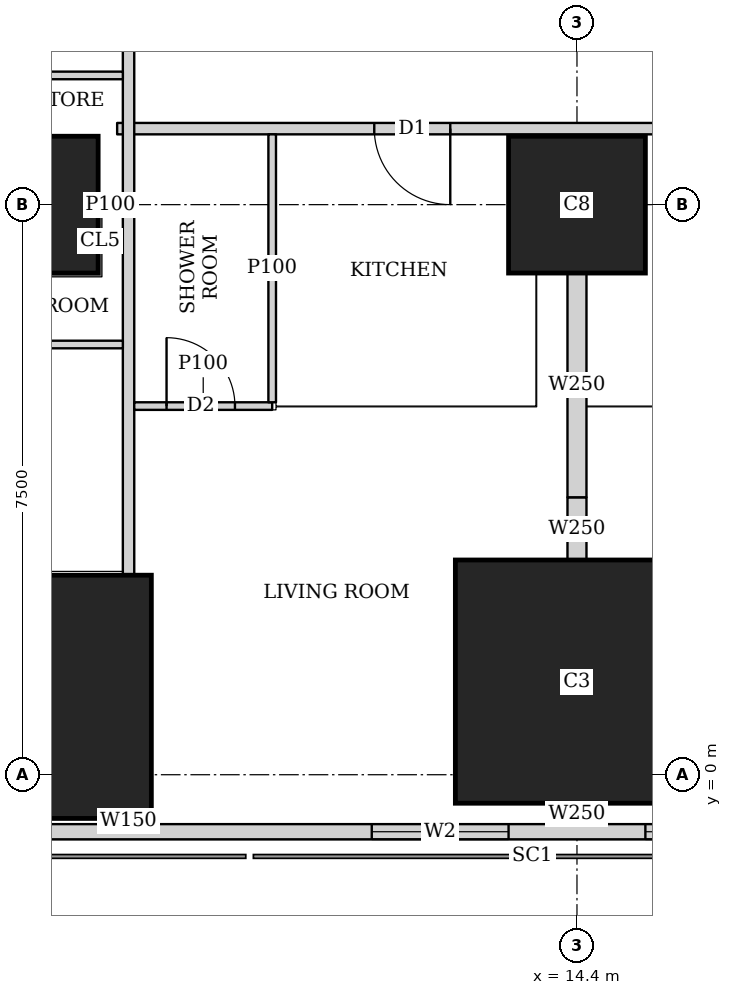
"""IFC4 building model, lengths in metres.
Left out: names, types, materials, properties, quantities, classifications, styles, units other than length and angle.
Written with IfcOpenShell. Run it as: python <this file> out.ifc"""

import sys

from ifc_helpers import new_model, si_unit, direction, frame, frame_2d, origin, origin_2d, place, context, subcontext, project, spatial, rectangle, extrude, element, fill, save


model = new_model("IFC4")
c1 = context("Model", 3, precision=1e-05, world=origin(), true_north=direction((0.0, 1.0)))
c2 = subcontext(c1, "Body", "Model", "MODEL_VIEW")
j1 = project(units=[si_unit("LENGTHUNIT", "METRE"), si_unit("PLANEANGLEUNIT", "RADIAN")], contexts=[c1])
p1 = place(None, origin())
s1 = spatial("IfcSite", under=j1, at=p1, CompositionType="ELEMENT")
p2 = place(p1, origin())
s2 = spatial("IfcBuilding", under=s1, at=p2, CompositionType="ELEMENT")
p3 = place(p2, frame((0.0, 0.0, 23.75)))
s3 = spatial("IfcBuildingStorey", under=s2, at=p3, CompositionType="ELEMENT", Elevation=23.75)
for number, where, z_axis, x_axis in (
    (1, (7.2, 1.025, 0.0), (0.0, 0.0, 1.0), (1.0, 0.0, 0.0)),
    (2, (14.4, 1.225, 0.0), (0.0, 0.0, 1.0), (1.0, 0.0, 0.0)),
):
    element("IfcColumn", number, at=place(p3, frame(where, z_axis=z_axis, x_axis=x_axis)), inside=s3, PredefinedType="COLUMN", context=c2, shape_type="SweptSolid", body=[
        extrude(rectangle(XDim=3.2, YDim=3.2, at=origin_2d()), origin(), (0.0, 0.0, 1.0), 3.75),
    ])
for number, where, z_axis, x_axis in (
    (3, (7.2, 7.5, 0.0), (0.0, 0.0, 1.0), (1.0, 0.0, 0.0)),
    (4, (14.4, 7.5, 0.0), (0.0, 0.0, 1.0), (1.0, 0.0, 0.0)),
):
    element("IfcColumn", number, at=place(p3, frame(where, z_axis=z_axis, x_axis=x_axis)), inside=s3, PredefinedType="COLUMN", context=c2, shape_type="SweptSolid", body=[
        extrude(rectangle(XDim=1.8, YDim=1.8, at=origin_2d()), origin(), (0.0, 0.0, 1.0), 3.75),
    ])
p4 = place(p3, frame((2.163, -0.75, 0.0), z_axis=(0.0, 0.0, 1.0), x_axis=(1.0, 0.0, 0.0)))
e5 = element("IfcWall", 5, at=p4, inside=s3, PredefinedType="SOLIDWALL", context=c2, shape_type="SweptSolid", body=[
    extrude(rectangle(XDim=45.628, YDim=0.2, at=frame_2d((22.814, 0.0))), origin(), (0.0, 0.0, 1.0), 3.5),
])
p5 = place(p4, frame((9.537, 0.0, 0.9)))
e6 = element("IfcOpeningElement", 6, at=p5, cuts=e5, PredefinedType="OPENING", context=c2, shape_type="SweptSolid", body=[
    extrude(rectangle(XDim=1.8, YDim=1.5, at=frame_2d((0.9, 0.75))), frame((0.0, 0.11, 0.0), z_axis=(0.0, -1.0, 0.0), x_axis=(1.0, 0.0, 0.0)), (0.0, 0.0, 1.0), 0.22),
])
p6 = place(p4, frame((13.137, 0.0, 0.9)))
e7 = element("IfcOpeningElement", 7, at=p6, cuts=e5, PredefinedType="OPENING", context=c2, shape_type="SweptSolid", body=[
    extrude(rectangle(XDim=1.8, YDim=1.5, at=frame_2d((0.9, 0.75))), frame((0.0, 0.11, 0.0), z_axis=(0.0, -1.0, 0.0), x_axis=(1.0, 0.0, 0.0)), (0.0, 0.0, 1.0), 0.22),
])
p7 = place(p4, frame((16.737, 0.0, 0.9)))
e8 = element("IfcOpeningElement", 8, at=p7, cuts=e5, PredefinedType="OPENING", context=c2, shape_type="SweptSolid", body=[
    extrude(rectangle(XDim=1.8, YDim=1.5, at=frame_2d((0.9, 0.75))), frame((0.0, 0.11, 0.0), z_axis=(0.0, -1.0, 0.0), x_axis=(1.0, 0.0, 0.0)), (0.0, 0.0, 1.0), 0.22),
])
p8 = place(p4, frame((20.337, 0.0, 0.9)))
e9 = element("IfcOpeningElement", 9, at=p8, cuts=e5, PredefinedType="OPENING", context=c2, shape_type="SweptSolid", body=[
    extrude(rectangle(XDim=1.8, YDim=1.5, at=frame_2d((0.9, 0.75))), frame((0.0, 0.11, 0.0), z_axis=(0.0, -1.0, 0.0), x_axis=(1.0, 0.0, 0.0)), (0.0, 0.0, 1.0), 0.22),
])
p9 = place(p4, frame((23.937, 0.0, 0.9)))
e10 = element("IfcOpeningElement", 10, at=p9, cuts=e5, PredefinedType="OPENING", context=c2, shape_type="SweptSolid", body=[
    extrude(rectangle(XDim=1.8, YDim=1.5, at=frame_2d((0.9, 0.75))), frame((0.0, 0.11, 0.0), z_axis=(0.0, -1.0, 0.0), x_axis=(1.0, 0.0, 0.0)), (0.0, 0.0, 1.0), 0.22),
])
p10 = place(p4, frame((27.537, 0.0, 0.9)))
e11 = element("IfcOpeningElement", 11, at=p10, cuts=e5, PredefinedType="OPENING", context=c2, shape_type="SweptSolid", body=[
    extrude(rectangle(XDim=1.8, YDim=1.5, at=frame_2d((0.9, 0.75))), frame((0.0, 0.11, 0.0), z_axis=(0.0, -1.0, 0.0), x_axis=(1.0, 0.0, 0.0)), (0.0, 0.0, 1.0), 0.22),
])
p11 = place(p4, frame((31.137, 0.0, 0.9)))
e12 = element("IfcOpeningElement", 12, at=p11, cuts=e5, PredefinedType="OPENING", context=c2, shape_type="SweptSolid", body=[
    extrude(rectangle(XDim=1.8, YDim=1.5, at=frame_2d((0.9, 0.75))), frame((0.0, 0.11, 0.0), z_axis=(0.0, -1.0, 0.0), x_axis=(1.0, 0.0, 0.0)), (0.0, 0.0, 1.0), 0.22),
])
p12 = place(p4, frame((34.737, 0.0, 0.9)))
e13 = element("IfcOpeningElement", 13, at=p12, cuts=e5, PredefinedType="OPENING", context=c2, shape_type="SweptSolid", body=[
    extrude(rectangle(XDim=1.8, YDim=1.5, at=frame_2d((0.9, 0.75))), frame((0.0, 0.11, 0.0), z_axis=(0.0, -1.0, 0.0), x_axis=(1.0, 0.0, 0.0)), (0.0, 0.0, 1.0), 0.22),
])
p13 = place(p3, frame((8.5, -0.65, 0.0), z_axis=(0.0, 0.0, 1.0), x_axis=(0.0, 1.0, 0.0)))
e14 = element("IfcWall", 14, at=p13, inside=s3, PredefinedType="SOLIDWALL", context=c2, shape_type="SweptSolid", body=[
    extrude(rectangle(XDim=0.074, YDim=0.15, at=frame_2d((0.037, 0.0))), origin(), (0.0, 0.0, 1.0), 3.5),
])
p14 = place(p3, frame((8.5, 2.626, 0.0), z_axis=(0.0, 0.0, 1.0), x_axis=(0.0, 1.0, 0.0)))
e15 = element("IfcWall", 15, at=p14, inside=s3, PredefinedType="SOLIDWALL", context=c2, shape_type="SweptSolid", body=[
    extrude(rectangle(XDim=39.773, YDim=0.15, at=frame_2d((19.886, 0.0))), origin(), (0.0, 0.0, 1.0), 2.05),
])
p15 = place(p14, frame((9.786, 0.0, 0.0)))
e16 = element("IfcOpeningElement", 16, at=p15, cuts=e15, PredefinedType="OPENING", context=c2, shape_type="SweptSolid", body=[
    extrude(rectangle(XDim=1.0, YDim=2.0, at=frame_2d((0.5, 1.0))), frame((0.0, 0.085, 0.0), z_axis=(0.0, -1.0, 0.0), x_axis=(1.0, 0.0, 0.0)), (0.0, 0.0, 1.0), 0.17),
])
p16 = place(p14, frame((13.961, 0.0, 0.0)))
e17 = element("IfcOpeningElement", 17, at=p16, cuts=e15, PredefinedType="OPENING", context=c2, shape_type="SweptSolid", body=[
    extrude(rectangle(XDim=1.0, YDim=2.0, at=frame_2d((0.5, 1.0))), frame((0.0, 0.085, 0.0), z_axis=(0.0, -1.0, 0.0), x_axis=(1.0, 0.0, 0.0)), (0.0, 0.0, 1.0), 0.17),
])
p17 = place(p14, frame((24.787, 0.0, 0.0)))
e18 = element("IfcOpeningElement", 18, at=p17, cuts=e15, PredefinedType="OPENING", context=c2, shape_type="SweptSolid", body=[
    extrude(rectangle(XDim=1.0, YDim=2.0, at=frame_2d((0.5, 1.0))), frame((0.0, 0.085, 0.0), z_axis=(0.0, -1.0, 0.0), x_axis=(1.0, 0.0, 0.0)), (0.0, 0.0, 1.0), 0.17),
])
p18 = place(p14, frame((32.287, 0.0, 0.0)))
e19 = element("IfcOpeningElement", 19, at=p18, cuts=e15, PredefinedType="OPENING", context=c2, shape_type="SweptSolid", body=[
    extrude(rectangle(XDim=1.0, YDim=2.0, at=frame_2d((0.5, 1.0))), frame((0.0, 0.085, 0.0), z_axis=(0.0, -1.0, 0.0), x_axis=(1.0, 0.0, 0.0)), (0.0, 0.0, 1.0), 0.17),
])
p19 = place(p3, frame((40.054, 8.5, 0.0), z_axis=(0.0, 0.0, 1.0), x_axis=(-1.0, 0.0, 0.0)))
e20 = element("IfcWall", 20, at=p19, inside=s3, PredefinedType="SOLIDWALL", context=c2, shape_type="SweptSolid", body=[
    extrude(rectangle(XDim=31.704, YDim=0.15, at=frame_2d((15.852, 0.0))), origin(), (0.0, 0.0, 1.0), 3.5),
])
p20 = place(p19, frame((27.321, 0.0, 0.0)))
e21 = element("IfcOpeningElement", 21, at=p20, cuts=e20, PredefinedType="OPENING", context=c2, shape_type="SweptSolid", body=[
    extrude(rectangle(XDim=1.0, YDim=2.1, at=frame_2d((0.5, 1.05))), frame((0.0, 0.085, 0.0), z_axis=(0.0, -1.0, 0.0), x_axis=(1.0, 0.0, 0.0)), (0.0, 0.0, 1.0), 0.17),
])
p21 = place(p19, frame((23.054, 0.0, 0.0)))
e22 = element("IfcOpeningElement", 22, at=p21, cuts=e20, PredefinedType="OPENING", context=c2, shape_type="SweptSolid", body=[
    extrude(rectangle(XDim=1.0, YDim=2.1, at=frame_2d((0.5, 1.05))), frame((0.0, 0.085, 0.0), z_axis=(0.0, -1.0, 0.0), x_axis=(1.0, 0.0, 0.0)), (0.0, 0.0, 1.0), 0.17),
])
p22 = place(p19, frame((15.754, 0.0, 0.0)))
e23 = element("IfcOpeningElement", 23, at=p22, cuts=e20, PredefinedType="OPENING", context=c2, shape_type="SweptSolid", body=[
    extrude(rectangle(XDim=1.0, YDim=2.1, at=frame_2d((0.5, 1.05))), frame((0.0, 0.085, 0.0), z_axis=(0.0, -1.0, 0.0), x_axis=(1.0, 0.0, 0.0)), (0.0, 0.0, 1.0), 0.17),
])
p23 = place(p19, frame((5.754, 0.0, 0.0)))
e24 = element("IfcOpeningElement", 24, at=p23, cuts=e20, PredefinedType="OPENING", context=c2, shape_type="SweptSolid", body=[
    extrude(rectangle(XDim=1.0, YDim=2.1, at=frame_2d((0.5, 1.05))), frame((0.0, 0.085, 0.0), z_axis=(0.0, -1.0, 0.0), x_axis=(1.0, 0.0, 0.0)), (0.0, 0.0, 1.0), 0.17),
])
p24 = place(p3, frame((8.101, 7.5, 0.0), z_axis=(0.0, 0.0, 1.0), x_axis=(1.0, 0.0, 0.0)))
e25 = element("IfcWall", 25, at=p24, inside=s3, PredefinedType="PARTITIONING", context=c2, shape_type="SweptSolid", body=[
    extrude(rectangle(XDim=0.324, YDim=0.1, at=frame_2d((0.162, 0.0))), origin(), (0.0, 0.0, 1.0), 3.5),
])
for number, where, z_axis, x_axis in (
    (26, (4.9, 9.2, 0.0), (0.0, 0.0, 1.0), (1.0, 0.0, 0.0)),
    (27, (4.9, 5.66, 0.0), (0.0, 0.0, 1.0), (1.0, 0.0, 0.0)),
):
    element("IfcWall", number, at=place(p3, frame(where, z_axis=z_axis, x_axis=x_axis)), inside=s3, PredefinedType="PARTITIONING", context=c2, shape_type="SweptSolid", body=[
        extrude(rectangle(XDim=3.525, YDim=0.1, at=frame_2d((1.763, 0.0))), origin(), (0.0, 0.0, 1.0), 3.5),
    ])
p25 = place(p3, frame((10.39, 4.85, 0.0), z_axis=(0.0, 0.0, 1.0), x_axis=(-1.0, 0.0, 0.0)))
e28 = element("IfcWall", 28, at=p25, inside=s3, PredefinedType="PARTITIONING", context=c2, shape_type="SweptSolid", body=[
    extrude(rectangle(XDim=1.815, YDim=0.1, at=frame_2d((0.907, 0.0))), origin(), (0.0, 0.0, 1.0), 3.5),
])
p26 = place(p25, frame((0.49, 0.0, 0.0)))
e29 = element("IfcOpeningElement", 29, at=p26, cuts=e28, PredefinedType="OPENING", context=c2, shape_type="SweptSolid", body=[
    extrude(rectangle(XDim=0.9, YDim=2.1, at=frame_2d((0.45, 1.05))), frame((0.0, 0.06, 0.0), z_axis=(0.0, -1.0, 0.0), x_axis=(1.0, 0.0, 0.0)), (0.0, 0.0, 1.0), 0.12),
])
p27 = place(p3, frame((10.39, 4.9, 0.0), z_axis=(0.0, 0.0, 1.0), x_axis=(0.0, 1.0, 0.0)))
e30 = element("IfcWall", 30, at=p27, inside=s3, PredefinedType="PARTITIONING", context=c2, shape_type="SweptSolid", body=[
    extrude(rectangle(XDim=3.525, YDim=0.1, at=frame_2d((1.763, 0.0))), origin(), (0.0, 0.0, 1.0), 3.5),
])
p28 = place(p3, frame((14.4, -0.65, 0.0), z_axis=(0.0, 0.0, 1.0), x_axis=(0.0, 1.0, 0.0)))
e31 = element("IfcWall", 31, at=p28, inside=s3, PredefinedType="SOLIDWALL", context=c2, shape_type="SweptSolid", body=[
    extrude(rectangle(XDim=0.274, YDim=0.25, at=frame_2d((0.137, 0.0))), origin(), (0.0, 0.0, 1.0), 2.05),
])
p29 = place(p3, frame((14.4, 2.826, 0.0), z_axis=(0.0, 0.0, 1.0), x_axis=(0.0, 1.0, 0.0)))
e32 = element("IfcWall", 32, at=p29, inside=s3, PredefinedType="SOLIDWALL", context=c2, shape_type="SweptSolid", body=[
    extrude(rectangle(XDim=0.824, YDim=0.25, at=frame_2d((0.412, 0.0))), origin(), (0.0, 0.0, 1.0), 2.05),
])
p30 = place(p3, frame((14.4, 3.65, 0.0), z_axis=(0.0, 0.0, 1.0), x_axis=(0.0, 1.0, 0.0)))
e33 = element("IfcWall", 33, at=p30, inside=s3, PredefinedType="SOLIDWALL", context=c2, shape_type="SweptSolid", body=[
    extrude(rectangle(XDim=2.949, YDim=0.25, at=frame_2d((1.475, 0.0))), origin(), (0.0, 0.0, 1.0), 3.5),
])
p31 = place(p5, origin())
e34 = element("IfcWindow", 34, at=p31, inside=s3, PartitioningType="SINGLE_PANEL", PredefinedType="WINDOW", context=c2, shape_type="SweptSolid", body=[
    extrude(rectangle(XDim=1.8, YDim=1.5, at=frame_2d((0.9, 0.75))), frame((0.0, 0.03, 0.0), z_axis=(0.0, -1.0, 0.0), x_axis=(1.0, 0.0, 0.0)), (0.0, 0.0, 1.0), 0.06),
])
fill(e6, e34)
p32 = place(p6, origin())
e35 = element("IfcWindow", 35, at=p32, inside=s3, PartitioningType="SINGLE_PANEL", PredefinedType="WINDOW", context=c2, shape_type="SweptSolid", body=[
    extrude(rectangle(XDim=1.8, YDim=1.5, at=frame_2d((0.9, 0.75))), frame((0.0, 0.03, 0.0), z_axis=(0.0, -1.0, 0.0), x_axis=(1.0, 0.0, 0.0)), (0.0, 0.0, 1.0), 0.06),
])
fill(e7, e35)
p33 = place(p26, origin())
e36 = element("IfcDoor", 36, at=p33, inside=s3, OperationType="SINGLE_SWING_LEFT", PredefinedType="DOOR", context=c2, shape_type="SweptSolid", body=[
    extrude(rectangle(XDim=0.9, YDim=2.1, at=frame_2d((0.45, 1.05))), frame((0.0, 0.025, 0.0), z_axis=(0.0, -1.0, 0.0), x_axis=(1.0, 0.0, 0.0)), (0.0, 0.0, 1.0), 0.05),
])
fill(e29, e36)
p34 = place(p20, origin())
e37 = element("IfcDoor", 37, at=p34, inside=s3, OperationType="SINGLE_SWING_LEFT", PredefinedType="DOOR", context=c2, shape_type="SweptSolid", body=[
    extrude(rectangle(XDim=1.0, YDim=2.1, at=frame_2d((0.5, 1.05))), frame((0.0, 0.025, 0.0), z_axis=(0.0, -1.0, 0.0), x_axis=(1.0, 0.0, 0.0)), (0.0, 0.0, 1.0), 0.05),
])
fill(e21, e37)
save(model, sys.argv[1])
